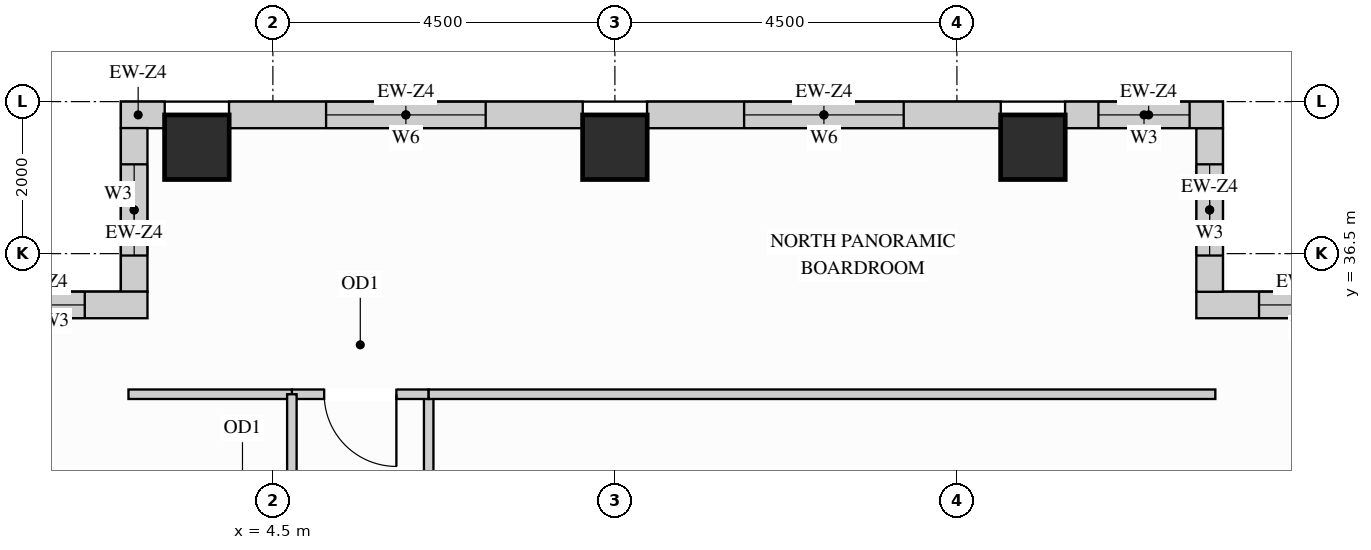
"""IFC4 building model, lengths in metres.
Left out: names, types, materials, properties, quantities, classifications, styles, units other than length and angle.
Written with IfcOpenShell. Run it as: python <this file> out.ifc"""

import sys

from ifc_helpers import new_model, si_unit, direction, frame, frame_2d, origin, origin_2d, place, context, subcontext, project, spatial, rectangle, extrude, source, transform, mapped, element, fill, save


model = new_model("IFC4")
c1 = context("Model", 3, precision=1e-05, world=origin(), true_north=direction((0.0, 1.0)))
c2 = subcontext(c1, "Body", "Model", "MODEL_VIEW")
j1 = project(units=[si_unit("LENGTHUNIT", "METRE"), si_unit("PLANEANGLEUNIT", "RADIAN")], contexts=[c1])
p1 = place(None, origin())
s1 = spatial("IfcSite", under=j1, at=p1, CompositionType="ELEMENT")
p2 = place(p1, origin())
s2 = spatial("IfcBuilding", under=s1, at=p2, CompositionType="ELEMENT")
p3 = place(p2, frame((0.0, 0.0, 241.2)))
s3 = spatial("IfcBuildingStorey", under=s2, at=p3, CompositionType="ELEMENT", Elevation=241.2)
m1 = source(origin(), c2, "Body", "SweptSolid", [
    extrude(rectangle(XDim=0.85, YDim=0.85, at=origin_2d()), origin(), (0.0, 0.0, 1.0), 3.4),
])
for number, where, z_axis, x_axis in (
    (1, (14.5, 37.9, 0.0), (0.0, 0.0, 1.0), (1.0, 0.0, 0.0)),
    (2, (3.5, 37.9, 0.0), (0.0, 0.0, 1.0), (1.0, 0.0, 0.0)),
    (3, (9.0, 37.9, 0.0), (0.0, 0.0, 1.0), (1.0, 0.0, 0.0)),
):
    element("IfcColumn", number, at=place(p3, frame(where, z_axis=z_axis, x_axis=x_axis)), inside=s3, PredefinedType="COLUMN", context=c2, shape_type="MappedRepresentation", body=[
        mapped(m1, transform((0.0, 0.0, 0.0), x_axis=(1.0, 0.0, 0.0), y_axis=(0.0, 1.0, 0.0), z_axis=(0.0, 0.0, 1.0))),
    ])
p4 = place(p3, frame((19.5, 35.825, 0.0), z_axis=(0.0, 0.0, 1.0), x_axis=(-1.0, 0.0, 0.0)))
e4 = element("IfcWall", 4, at=p4, inside=s3, PredefinedType="SOLIDWALL", context=c2, shape_type="SweptSolid", body=[
    extrude(rectangle(XDim=2.85, YDim=0.35, at=frame_2d((1.425, 0.0))), origin(), (0.0, 0.0, 1.0), 3.385),
])
p5 = place(p4, frame((0.825, 0.0, 0.78)))
e5 = element("IfcOpeningElement", 5, at=p5, cuts=e4, PredefinedType="OPENING", context=c2, shape_type="SweptSolid", body=[
    extrude(rectangle(XDim=1.2, YDim=2.25, at=frame_2d((0.6, 1.125))), frame((0.0, 0.185, 0.0), z_axis=(0.0, -1.0, 0.0), x_axis=(1.0, 0.0, 0.0)), (0.0, 0.0, 1.0), 0.37),
])
p6 = place(p3, frame((16.825, 35.998, 0.0), z_axis=(0.0, 0.0, 1.0), x_axis=(0.0, 1.0, 0.0)))
e6 = element("IfcWall", 6, at=p6, inside=s3, PredefinedType="SOLIDWALL", context=c2, shape_type="SweptSolid", body=[
    extrude(rectangle(XDim=2.154, YDim=0.35, at=frame_2d((1.077, 0.0))), origin(), (0.0, 0.0, 1.0), 3.385),
])
p7 = place(p6, frame((0.477, 0.0, 0.78)))
e7 = element("IfcOpeningElement", 7, at=p7, cuts=e6, PredefinedType="OPENING", context=c2, shape_type="SweptSolid", body=[
    extrude(rectangle(XDim=1.2, YDim=2.25, at=frame_2d((0.6, 1.125))), frame((0.0, 0.185, 0.0), z_axis=(0.0, -1.0, 0.0), x_axis=(1.0, 0.0, 0.0)), (0.0, 0.0, 1.0), 0.37),
])
p8 = place(p3, frame((17.0, 38.325, 0.0), z_axis=(0.0, 0.0, 1.0), x_axis=(-1.0, 0.0, 0.0)))
e8 = element("IfcWall", 8, at=p8, inside=s3, PredefinedType="SOLIDWALL", context=c2, shape_type="SweptSolid", body=[
    extrude(rectangle(XDim=2.077, YDim=0.35, at=frame_2d((1.039, 0.0))), origin(), (0.0, 0.0, 1.0), 3.385),
])
p9 = place(p8, frame((0.438, 0.0, 0.78)))
e9 = element("IfcOpeningElement", 9, at=p9, cuts=e8, PredefinedType="OPENING", context=c2, shape_type="SweptSolid", body=[
    extrude(rectangle(XDim=1.2, YDim=2.25, at=frame_2d((0.6, 1.125))), frame((0.0, 0.185, 0.0), z_axis=(0.0, -1.0, 0.0), x_axis=(1.0, 0.0, 0.0)), (0.0, 0.0, 1.0), 0.37),
])
p10 = place(p3, frame((14.077, 38.325, 0.0), z_axis=(0.0, 0.0, 1.0), x_axis=(-1.0, 0.0, 0.0)))
e10 = element("IfcWall", 10, at=p10, inside=s3, PredefinedType="SOLIDWALL", context=c2, shape_type="SweptSolid", body=[
    extrude(rectangle(XDim=4.654, YDim=0.35, at=frame_2d((2.327, 0.0))), origin(), (0.0, 0.0, 1.0), 3.385),
])
p11 = place(p10, frame((1.277, 0.0, 0.78)))
e11 = element("IfcOpeningElement", 11, at=p11, cuts=e10, PredefinedType="OPENING", context=c2, shape_type="SweptSolid", body=[
    extrude(rectangle(XDim=2.1, YDim=2.25, at=frame_2d((1.05, 1.125))), frame((0.0, 0.185, 0.0), z_axis=(0.0, -1.0, 0.0), x_axis=(1.0, 0.0, 0.0)), (0.0, 0.0, 1.0), 0.37),
])
p12 = place(p3, frame((8.577, 38.325, 0.0), z_axis=(0.0, 0.0, 1.0), x_axis=(-1.0, 0.0, 0.0)))
e12 = element("IfcWall", 12, at=p12, inside=s3, PredefinedType="SOLIDWALL", context=c2, shape_type="SweptSolid", body=[
    extrude(rectangle(XDim=4.654, YDim=0.35, at=frame_2d((2.327, 0.0))), origin(), (0.0, 0.0, 1.0), 3.385),
])
p13 = place(p12, frame((1.277, 0.0, 0.78)))
e13 = element("IfcOpeningElement", 13, at=p13, cuts=e12, PredefinedType="OPENING", context=c2, shape_type="SweptSolid", body=[
    extrude(rectangle(XDim=2.1, YDim=2.25, at=frame_2d((1.05, 1.125))), frame((0.0, 0.185, 0.0), z_axis=(0.0, -1.0, 0.0), x_axis=(1.0, 0.0, 0.0)), (0.0, 0.0, 1.0), 0.37),
])
m2 = source(origin(), c2, "Body", "SweptSolid", [
    extrude(rectangle(XDim=0.577, YDim=0.35, at=frame_2d((0.289, 0.0))), origin(), (0.0, 0.0, 1.0), 3.385),
])
p14 = place(p3, frame((3.077, 38.325, 0.0), z_axis=(0.0, 0.0, 1.0), x_axis=(-1.0, 0.0, 0.0)))
e14 = element("IfcWall", 14, at=p14, inside=s3, PredefinedType="SOLIDWALL", context=c2, shape_type="MappedRepresentation", body=[
    mapped(m2, transform((0.0, 0.0, 0.0), x_axis=(1.0, 0.0, 0.0), y_axis=(0.0, 1.0, 0.0), z_axis=(0.0, 0.0, 1.0))),
])
p15 = place(p3, frame((2.675, 38.152, 0.0), z_axis=(0.0, 0.0, 1.0), x_axis=(0.0, -1.0, 0.0)))
e15 = element("IfcWall", 15, at=p15, inside=s3, PredefinedType="SOLIDWALL", context=c2, shape_type="SweptSolid", body=[
    extrude(rectangle(XDim=2.154, YDim=0.35, at=frame_2d((1.077, 0.0))), origin(), (0.0, 0.0, 1.0), 3.385),
])
p16 = place(p15, frame((0.477, 0.0, 0.78)))
e16 = element("IfcOpeningElement", 16, at=p16, cuts=e15, PredefinedType="OPENING", context=c2, shape_type="SweptSolid", body=[
    extrude(rectangle(XDim=1.2, YDim=2.25, at=frame_2d((0.6, 1.125))), frame((0.0, 0.185, 0.0), z_axis=(0.0, -1.0, 0.0), x_axis=(1.0, 0.0, 0.0)), (0.0, 0.0, 1.0), 0.37),
])
p17 = place(p3, frame((2.85, 35.825, 0.0), z_axis=(0.0, 0.0, 1.0), x_axis=(-1.0, 0.0, 0.0)))
e17 = element("IfcWall", 17, at=p17, inside=s3, PredefinedType="SOLIDWALL", context=c2, shape_type="SweptSolid", body=[
    extrude(rectangle(XDim=2.85, YDim=0.35, at=frame_2d((1.425, 0.0))), origin(), (0.0, 0.0, 1.0), 3.385),
])
p18 = place(p17, frame((0.825, 0.0, 0.78)))
e18 = element("IfcOpeningElement", 18, at=p18, cuts=e17, PredefinedType="OPENING", context=c2, shape_type="SweptSolid", body=[
    extrude(rectangle(XDim=1.2, YDim=2.25, at=frame_2d((0.6, 1.125))), frame((0.0, 0.185, 0.0), z_axis=(0.0, -1.0, 0.0), x_axis=(1.0, 0.0, 0.0)), (0.0, 0.0, 1.0), 0.37),
])
p19 = place(p3, frame((6.55, 31.55, 0.0), z_axis=(0.0, 0.0, 1.0), x_axis=(0.0, 1.0, 0.0)))
e19 = element("IfcWall", 19, at=p19, inside=s3, PredefinedType="PARTITIONING", context=c2, shape_type="SweptSolid", body=[
    extrude(rectangle(XDim=3.1, YDim=0.125, at=frame_2d((1.55, 0.0))), origin(), (0.0, 0.0, 1.0), 3.385),
])
p20 = place(p19, frame((1.075, 0.0, 0.0)))
e20 = element("IfcOpeningElement", 20, at=p20, cuts=e19, PredefinedType="OPENING", context=c2, shape_type="SweptSolid", body=[
    extrude(rectangle(XDim=0.95, YDim=2.15, at=frame_2d((0.475, 1.075))), frame((0.0, 0.073, 0.0), z_axis=(0.0, -1.0, 0.0), x_axis=(1.0, 0.0, 0.0)), (0.0, 0.0, 1.0), 0.145),
])
p21 = place(p3, frame((4.75, 34.65, 0.0), z_axis=(0.0, 0.0, 1.0), x_axis=(1.0, 0.0, 0.0)))
e21 = element("IfcWall", 21, at=p21, inside=s3, PredefinedType="PARTITIONING", context=c2, shape_type="SweptSolid", body=[
    extrude(rectangle(XDim=1.8, YDim=0.125, at=frame_2d((0.9, 0.0))), origin(), (0.0, 0.0, 1.0), 3.385),
])
p22 = place(p21, frame((0.425, 0.0, 0.0)))
e22 = element("IfcOpeningElement", 22, at=p22, cuts=e21, PredefinedType="OPENING", context=c2, shape_type="SweptSolid", body=[
    extrude(rectangle(XDim=0.95, YDim=2.15, at=frame_2d((0.475, 1.075))), frame((0.0, 0.073, 0.0), z_axis=(0.0, -1.0, 0.0), x_axis=(1.0, 0.0, 0.0)), (0.0, 0.0, 1.0), 0.145),
])
m3 = source(origin(), c2, "Body", "SweptSolid", [
    extrude(rectangle(XDim=10.35, YDim=0.125, at=frame_2d((5.175, 0.0))), origin(), (0.0, 0.0, 1.0), 3.385),
])
p23 = place(p3, frame((6.55, 34.65, 0.0), z_axis=(0.0, 0.0, 1.0), x_axis=(1.0, 0.0, 0.0)))
e23 = element("IfcWall", 23, at=p23, inside=s3, PredefinedType="PARTITIONING", context=c2, shape_type="MappedRepresentation", body=[
    mapped(m3, transform((0.0, 0.0, 0.0), x_axis=(1.0, 0.0, 0.0), y_axis=(0.0, 1.0, 0.0), z_axis=(0.0, 0.0, 1.0))),
])
m4 = source(origin(), c2, "Body", "SweptSolid", [
    extrude(rectangle(XDim=2.15, YDim=0.125, at=frame_2d((1.075, 0.0))), origin(), (0.0, 0.0, 1.0), 3.385),
])
p24 = place(p3, frame((2.6, 34.65, 0.0), z_axis=(0.0, 0.0, 1.0), x_axis=(1.0, 0.0, 0.0)))
e24 = element("IfcWall", 24, at=p24, inside=s3, PredefinedType="PARTITIONING", context=c2, shape_type="MappedRepresentation", body=[
    mapped(m4, transform((0.0, 0.0, 0.0), x_axis=(1.0, 0.0, 0.0), y_axis=(0.0, 1.0, 0.0), z_axis=(0.0, 0.0, 1.0))),
])
p25 = place(p3, frame((4.75, 31.55, 0.0), z_axis=(0.0, 0.0, 1.0), x_axis=(0.0, 1.0, 0.0)))
e25 = element("IfcWall", 25, at=p25, inside=s3, PredefinedType="PARTITIONING", context=c2, shape_type="SweptSolid", body=[
    extrude(rectangle(XDim=3.1, YDim=0.125, at=frame_2d((1.55, 0.0))), origin(), (0.0, 0.0, 1.0), 3.385),
])
p26 = place(p25, frame((1.075, 0.0, 0.0)))
e26 = element("IfcOpeningElement", 26, at=p26, cuts=e25, PredefinedType="OPENING", context=c2, shape_type="SweptSolid", body=[
    extrude(rectangle(XDim=0.95, YDim=2.15, at=frame_2d((0.475, 1.075))), frame((0.0, 0.073, 0.0), z_axis=(0.0, -1.0, 0.0), x_axis=(1.0, 0.0, 0.0)), (0.0, 0.0, 1.0), 0.145),
])
m5 = source(origin(), c2, "Body", "SweptSolid", [
    extrude(rectangle(XDim=0.95, YDim=2.15, at=frame_2d((0.475, 1.075))), frame((0.0, 0.025, 0.0), z_axis=(0.0, -1.0, 0.0), x_axis=(1.0, 0.0, 0.0)), (0.0, 0.0, 1.0), 0.05),
])
p27 = place(p22, origin())
e27 = element("IfcDoor", 27, at=p27, inside=s3, OperationType="SINGLE_SWING_RIGHT", PredefinedType="DOOR", context=c2, shape_type="MappedRepresentation", body=[
    mapped(m5, transform((0.0, 0.0, 0.0), x_axis=(1.0, 0.0, 0.0), y_axis=(0.0, 1.0, 0.0), z_axis=(0.0, 0.0, 1.0))),
])
fill(e22, e27)
m6 = source(origin(), c2, "Body", "SweptSolid", [
    extrude(rectangle(XDim=1.2, YDim=2.25, at=frame_2d((0.6, 1.125))), frame((0.0, 0.03, 0.0), z_axis=(0.0, -1.0, 0.0), x_axis=(1.0, 0.0, 0.0)), (0.0, 0.0, 1.0), 0.06),
])
p28 = place(p5, origin())
e28 = element("IfcWindow", 28, at=p28, inside=s3, PartitioningType="SINGLE_PANEL", PredefinedType="WINDOW", context=c2, shape_type="MappedRepresentation", body=[
    mapped(m6, transform((0.0, 0.0, 0.0), x_axis=(1.0, 0.0, 0.0), y_axis=(0.0, 1.0, 0.0), z_axis=(0.0, 0.0, 1.0))),
])
fill(e5, e28)
p29 = place(p7, origin())
e29 = element("IfcWindow", 29, at=p29, inside=s3, PartitioningType="SINGLE_PANEL", PredefinedType="WINDOW", context=c2, shape_type="MappedRepresentation", body=[
    mapped(m6, transform((0.0, 0.0, 0.0), x_axis=(1.0, 0.0, 0.0), y_axis=(0.0, 1.0, 0.0), z_axis=(0.0, 0.0, 1.0))),
])
fill(e7, e29)
p30 = place(p9, origin())
e30 = element("IfcWindow", 30, at=p30, inside=s3, PartitioningType="SINGLE_PANEL", PredefinedType="WINDOW", context=c2, shape_type="MappedRepresentation", body=[
    mapped(m6, transform((0.0, 0.0, 0.0), x_axis=(1.0, 0.0, 0.0), y_axis=(0.0, 1.0, 0.0), z_axis=(0.0, 0.0, 1.0))),
])
fill(e9, e30)
p31 = place(p16, origin())
e31 = element("IfcWindow", 31, at=p31, inside=s3, PartitioningType="SINGLE_PANEL", PredefinedType="WINDOW", context=c2, shape_type="MappedRepresentation", body=[
    mapped(m6, transform((0.0, 0.0, 0.0), x_axis=(1.0, 0.0, 0.0), y_axis=(0.0, 1.0, 0.0), z_axis=(0.0, 0.0, 1.0))),
])
fill(e16, e31)
p32 = place(p18, origin())
e32 = element("IfcWindow", 32, at=p32, inside=s3, PartitioningType="SINGLE_PANEL", PredefinedType="WINDOW", context=c2, shape_type="MappedRepresentation", body=[
    mapped(m6, transform((0.0, 0.0, 0.0), x_axis=(1.0, 0.0, 0.0), y_axis=(0.0, 1.0, 0.0), z_axis=(0.0, 0.0, 1.0))),
])
fill(e18, e32)
m7 = source(origin(), c2, "Body", "SweptSolid", [
    extrude(rectangle(XDim=2.1, YDim=2.25, at=frame_2d((1.05, 1.125))), frame((0.0, 0.03, 0.0), z_axis=(0.0, -1.0, 0.0), x_axis=(1.0, 0.0, 0.0)), (0.0, 0.0, 1.0), 0.06),
])
p33 = place(p11, origin())
e33 = element("IfcWindow", 33, at=p33, inside=s3, PartitioningType="SINGLE_PANEL", PredefinedType="WINDOW", context=c2, shape_type="MappedRepresentation", body=[
    mapped(m7, transform((0.0, 0.0, 0.0), x_axis=(1.0, 0.0, 0.0), y_axis=(0.0, 1.0, 0.0), z_axis=(0.0, 0.0, 1.0))),
])
fill(e11, e33)
p34 = place(p13, origin())
e34 = element("IfcWindow", 34, at=p34, inside=s3, PartitioningType="SINGLE_PANEL", PredefinedType="WINDOW", context=c2, shape_type="MappedRepresentation", body=[
    mapped(m7, transform((0.0, 0.0, 0.0), x_axis=(1.0, 0.0, 0.0), y_axis=(0.0, 1.0, 0.0), z_axis=(0.0, 0.0, 1.0))),
])
fill(e13, e34)
save(model, sys.argv[1])
